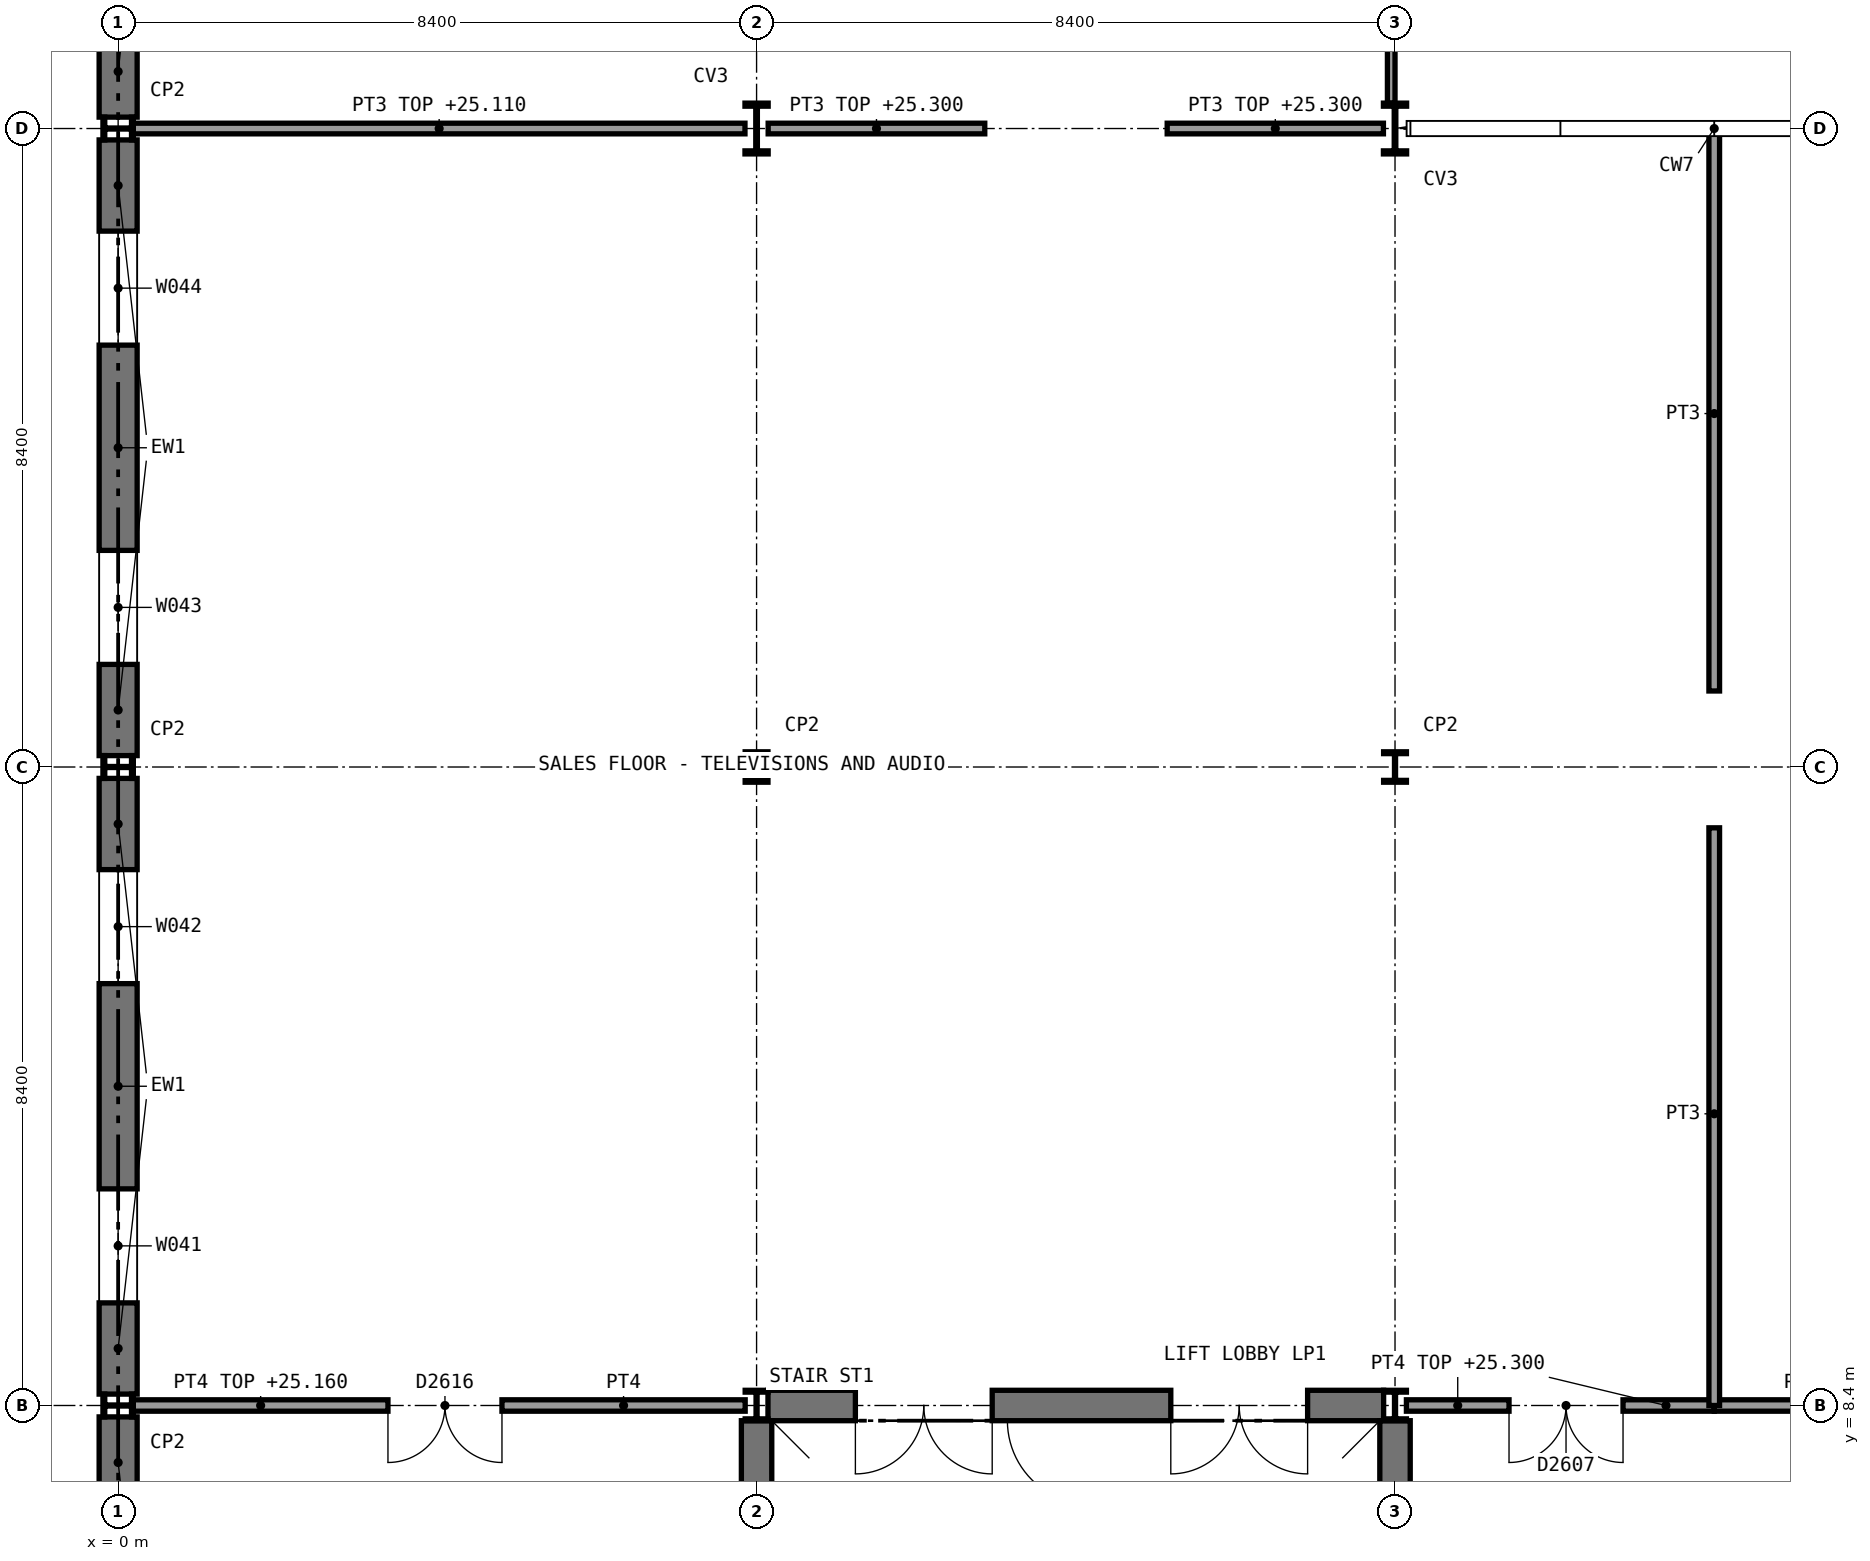
"""IFC4 building model, lengths in metres.
Left out: names, types, materials, properties, quantities, classifications, styles, units other than length and angle.
Written with IfcOpenShell. Run it as: python <this file> out.ifc"""

import sys

from ifc_helpers import new_model, si_unit, direction, frame, frame_2d, origin, origin_2d, place, context, subcontext, project, spatial, rectangle, i_section, extrude, element, fill, save


model = new_model("IFC4")
c1 = context("Model", 3, precision=1e-05, world=origin(), true_north=direction((0.0, 1.0)))
c2 = subcontext(c1, "Body", "Model", "MODEL_VIEW")
j1 = project(units=[si_unit("LENGTHUNIT", "METRE"), si_unit("PLANEANGLEUNIT", "RADIAN")], contexts=[c1])
p1 = place(None, origin())
s1 = spatial("IfcSite", under=j1, at=p1, CompositionType="ELEMENT")
p2 = place(p1, origin())
s2 = spatial("IfcBuilding", under=s1, at=p2, CompositionType="ELEMENT")
p3 = place(p2, frame((0.0, 0.0, 21.0)))
s3 = spatial("IfcBuildingStorey", under=s2, at=p3, CompositionType="ELEMENT", Elevation=21.0)
p4 = place(p3, frame((8.55, 8.4, 0.0), z_axis=(0.0, 0.0, 1.0), x_axis=(1.0, 0.0, 0.0)))
e1 = element("IfcWall", 1, at=p4, inside=s3, PredefinedType="SHEAR", context=c2, shape_type="SweptSolid", body=[
    extrude(rectangle(XDim=8.1, YDim=0.4, at=frame_2d((4.05, 0.0))), origin(), (0.0, 0.0, 1.0), 4.65),
])
p5 = place(p4, frame((1.15, 0.0, 0.0)))
e2 = element("IfcOpeningElement", 2, at=p5, cuts=e1, PredefinedType="OPENING", context=c2, shape_type="SweptSolid", body=[
    extrude(rectangle(XDim=1.8, YDim=2.1, at=frame_2d((0.9, 1.05))), frame((0.0, 0.21, 0.0), z_axis=(0.0, -1.0, 0.0), x_axis=(1.0, 0.0, 0.0)), (0.0, 0.0, 1.0), 0.42),
])
p6 = place(p4, frame((5.3, 0.0, 0.0)))
e3 = element("IfcOpeningElement", 3, at=p6, cuts=e1, PredefinedType="OPENING", context=c2, shape_type="SweptSolid", body=[
    extrude(rectangle(XDim=1.8, YDim=2.1, at=frame_2d((0.9, 1.05))), frame((0.0, 0.21, 0.0), z_axis=(0.0, -1.0, 0.0), x_axis=(1.0, 0.0, 0.0)), (0.0, 0.0, 1.0), 0.42),
])
for number, where, z_axis, x_axis in (
    (4, (8.4, 0.2, 0.0), (0.0, 0.0, 1.0), (0.0, 1.0, 0.0)),
    (5, (16.8, 0.2, 0.0), (0.0, 0.0, 1.0), (0.0, 1.0, 0.0)),
):
    element("IfcWall", number, at=place(p3, frame(where, z_axis=z_axis, x_axis=x_axis)), inside=s3, PredefinedType="SHEAR", context=c2, shape_type="SweptSolid", body=[
        extrude(rectangle(XDim=8.0, YDim=0.4, at=frame_2d((4.0, 0.0))), origin(), (0.0, 0.0, 1.0), 4.65),
    ])
for number, where, z_axis, x_axis in (
    (6, (0.0, 8.4, 0.0), (0.0, 0.0, 1.0), (0.0, 1.0, 0.0)),
    (7, (0.0, 16.8, 0.0), (0.0, 0.0, 1.0), (0.0, 1.0, 0.0)),
    (8, (0.0, 25.2, 0.0), (0.0, 0.0, 1.0), (0.0, 1.0, 0.0)),
    (9, (8.4, 8.4, 0.0), (0.0, 0.0, 1.0), (1.0, 0.0, 0.0)),
    (10, (8.4, 16.8, 0.0), (0.0, 0.0, 1.0), (1.0, 0.0, 0.0)),
):
    element("IfcColumn", number, at=place(p3, frame(where, z_axis=z_axis, x_axis=x_axis)), inside=s3, PredefinedType="COLUMN", context=c2, shape_type="SweptSolid", body=[
        extrude(i_section(OverallWidth=0.3, OverallDepth=0.4, WebThickness=0.013, FlangeThickness=0.024, FilletRadius=0.027, at=origin_2d()), origin(), (0.0, 0.0, 1.0), 4.8),
    ])
p7 = place(p3, frame((8.4, 25.2, 0.0), z_axis=(0.0, 0.0, 1.0), x_axis=(1.0, 0.0, 0.0)))
e11 = element("IfcColumn", 11, at=p7, inside=s3, PredefinedType="COLUMN", context=c2, shape_type="SweptSolid", body=[
    extrude(i_section(OverallWidth=0.305, OverallDepth=0.668, WebThickness=0.021, FlangeThickness=0.04, FilletRadius=0.027, at=origin_2d()), origin(), (0.0, 0.0, 1.0), 4.8),
])
for number, where, z_axis, x_axis in (
    (12, (16.8, 8.4, 0.0), (0.0, 0.0, 1.0), (1.0, 0.0, 0.0)),
    (13, (16.8, 16.8, 0.0), (0.0, 0.0, 1.0), (1.0, 0.0, 0.0)),
):
    element("IfcColumn", number, at=place(p3, frame(where, z_axis=z_axis, x_axis=x_axis)), inside=s3, PredefinedType="COLUMN", context=c2, shape_type="SweptSolid", body=[
        extrude(i_section(OverallWidth=0.3, OverallDepth=0.4, WebThickness=0.013, FlangeThickness=0.024, FilletRadius=0.027, at=origin_2d()), origin(), (0.0, 0.0, 1.0), 4.8),
    ])
p8 = place(p3, frame((16.8, 25.2, 0.0), z_axis=(0.0, 0.0, 1.0), x_axis=(1.0, 0.0, 0.0)))
e14 = element("IfcColumn", 14, at=p8, inside=s3, PredefinedType="COLUMN", context=c2, shape_type="SweptSolid", body=[
    extrude(i_section(OverallWidth=0.305, OverallDepth=0.668, WebThickness=0.021, FlangeThickness=0.04, FilletRadius=0.027, at=origin_2d()), origin(), (0.0, 0.0, 1.0), 4.8),
])
p9 = place(p3, frame((16.95, 8.4, 0.0), z_axis=(0.0, 0.0, 1.0), x_axis=(1.0, 0.0, 0.0)))
e15 = element("IfcWall", 15, at=p9, inside=s3, PredefinedType="SOLIDWALL", context=c2, shape_type="SweptSolid", body=[
    extrude(rectangle(XDim=4.05, YDim=0.15, at=frame_2d((2.025, 0.0))), origin(), (0.0, 0.0, 1.0), 4.3),
])
p10 = place(p9, frame((1.35, 0.0, 0.0)))
e16 = element("IfcOpeningElement", 16, at=p10, cuts=e15, PredefinedType="OPENING", context=c2, shape_type="SweptSolid", body=[
    extrude(rectangle(XDim=1.5, YDim=2.1, at=frame_2d((0.75, 1.05))), frame((0.0, 0.085, 0.0), z_axis=(0.0, -1.0, 0.0), x_axis=(1.0, 0.0, 0.0)), (0.0, 0.0, 1.0), 0.17),
])
p11 = place(p3, frame((21.0, 8.4, 0.0), z_axis=(0.0, 0.0, 1.0), x_axis=(1.0, 0.0, 0.0)))
e17 = element("IfcWall", 17, at=p11, inside=s3, PredefinedType="SOLIDWALL", context=c2, shape_type="SweptSolid", body=[
    extrude(rectangle(XDim=4.05, YDim=0.15, at=frame_2d((2.025, 0.0))), origin(), (0.0, 0.0, 1.0), 4.3),
])
p12 = place(p3, frame((0.2, 8.4, 0.0), z_axis=(0.0, 0.0, 1.0), x_axis=(1.0, 0.0, 0.0)))
e18 = element("IfcWall", 18, at=p12, inside=s3, PredefinedType="SOLIDWALL", context=c2, shape_type="SweptSolid", body=[
    extrude(rectangle(XDim=8.05, YDim=0.15, at=frame_2d((4.025, 0.0))), origin(), (0.0, 0.0, 1.0), 4.16),
])
p13 = place(p12, frame((3.35, 0.0, 0.0)))
e19 = element("IfcOpeningElement", 19, at=p13, cuts=e18, PredefinedType="OPENING", context=c2, shape_type="SweptSolid", body=[
    extrude(rectangle(XDim=1.5, YDim=2.1, at=frame_2d((0.75, 1.05))), frame((0.0, 0.085, 0.0), z_axis=(0.0, -1.0, 0.0), x_axis=(1.0, 0.0, 0.0)), (0.0, 0.0, 1.0), 0.17),
])
p14 = place(p3, frame((21.0, 8.4, 0.0), z_axis=(0.0, 0.0, 1.0), x_axis=(0.0, 1.0, 0.0)))
e20 = element("IfcWall", 20, at=p14, inside=s3, PredefinedType="PARTITIONING", context=c2, shape_type="SweptSolid", body=[
    extrude(rectangle(XDim=7.6, YDim=0.14, at=frame_2d((3.8, 0.0))), origin(), (0.0, 0.0, 1.0), 4.65),
])
p15 = place(p3, frame((21.0, 17.8, 0.0), z_axis=(0.0, 0.0, 1.0), x_axis=(0.0, 1.0, 0.0)))
e21 = element("IfcWall", 21, at=p15, inside=s3, PredefinedType="PARTITIONING", context=c2, shape_type="SweptSolid", body=[
    extrude(rectangle(XDim=7.4, YDim=0.14, at=frame_2d((3.7, 0.0))), origin(), (0.0, 0.0, 1.0), 4.65),
])
p16 = place(p3, frame((0.2, 25.2, 0.0), z_axis=(0.0, 0.0, 1.0), x_axis=(1.0, 0.0, 0.0)))
e22 = element("IfcWall", 22, at=p16, inside=s3, PredefinedType="PARTITIONING", context=c2, shape_type="SweptSolid", body=[
    extrude(rectangle(XDim=8.047, YDim=0.14, at=frame_2d((4.024, 0.0))), origin(), (0.0, 0.0, 1.0), 4.11),
])
p17 = place(p3, frame((8.552, 25.2, 0.0), z_axis=(0.0, 0.0, 1.0), x_axis=(1.0, 0.0, 0.0)))
e23 = element("IfcWall", 23, at=p17, inside=s3, PredefinedType="PARTITIONING", context=c2, shape_type="SweptSolid", body=[
    extrude(rectangle(XDim=2.85, YDim=0.14, at=frame_2d((1.425, 0.0))), origin(), (0.0, 0.0, 1.0), 4.3),
])
p18 = place(p3, frame((13.802, 25.2, 0.0), z_axis=(0.0, 0.0, 1.0), x_axis=(1.0, 0.0, 0.0)))
e24 = element("IfcWall", 24, at=p18, inside=s3, PredefinedType="PARTITIONING", context=c2, shape_type="SweptSolid", body=[
    extrude(rectangle(XDim=2.845, YDim=0.14, at=frame_2d((1.422, 0.0))), origin(), (0.0, 0.0, 1.0), 4.3),
])
p19 = place(p3, frame((0.0, 0.15, 0.0), z_axis=(0.0, 0.0, 1.0), x_axis=(0.0, 1.0, 0.0)))
e25 = element("IfcWall", 25, at=p19, inside=s3, PredefinedType="STANDARD", context=c2, shape_type="SweptSolid", body=[
    extrude(rectangle(XDim=8.1, YDim=0.5, at=frame_2d((4.05, 0.0))), origin(), (0.0, 0.0, 1.0), 4.65),
])
p20 = place(p19, frame((1.2, 0.0, 1.0)))
e26 = element("IfcOpeningElement", 26, at=p20, cuts=e25, PredefinedType="OPENING", context=c2, shape_type="SweptSolid", body=[
    extrude(rectangle(XDim=1.5, YDim=2.4, at=frame_2d((0.75, 1.2))), frame((0.0, 0.26, 0.0), z_axis=(0.0, -1.0, 0.0), x_axis=(1.0, 0.0, 0.0)), (0.0, 0.0, 1.0), 0.52),
])
p21 = place(p19, frame((5.4, 0.0, 1.0)))
e27 = element("IfcOpeningElement", 27, at=p21, cuts=e25, PredefinedType="OPENING", context=c2, shape_type="SweptSolid", body=[
    extrude(rectangle(XDim=1.5, YDim=2.4, at=frame_2d((0.75, 1.2))), frame((0.0, 0.26, 0.0), z_axis=(0.0, -1.0, 0.0), x_axis=(1.0, 0.0, 0.0)), (0.0, 0.0, 1.0), 0.52),
])
p22 = place(p3, frame((0.0, 8.55, 0.0), z_axis=(0.0, 0.0, 1.0), x_axis=(0.0, 1.0, 0.0)))
e28 = element("IfcWall", 28, at=p22, inside=s3, PredefinedType="STANDARD", context=c2, shape_type="SweptSolid", body=[
    extrude(rectangle(XDim=8.1, YDim=0.5, at=frame_2d((4.05, 0.0))), origin(), (0.0, 0.0, 1.0), 4.65),
])
p23 = place(p22, frame((1.2, 0.0, 1.0)))
e29 = element("IfcOpeningElement", 29, at=p23, cuts=e28, PredefinedType="OPENING", context=c2, shape_type="SweptSolid", body=[
    extrude(rectangle(XDim=1.5, YDim=2.4, at=frame_2d((0.75, 1.2))), frame((0.0, 0.26, 0.0), z_axis=(0.0, -1.0, 0.0), x_axis=(1.0, 0.0, 0.0)), (0.0, 0.0, 1.0), 0.52),
])
p24 = place(p22, frame((5.4, 0.0, 1.0)))
e30 = element("IfcOpeningElement", 30, at=p24, cuts=e28, PredefinedType="OPENING", context=c2, shape_type="SweptSolid", body=[
    extrude(rectangle(XDim=1.5, YDim=2.4, at=frame_2d((0.75, 1.2))), frame((0.0, 0.26, 0.0), z_axis=(0.0, -1.0, 0.0), x_axis=(1.0, 0.0, 0.0)), (0.0, 0.0, 1.0), 0.52),
])
p25 = place(p3, frame((0.0, 16.95, 0.0), z_axis=(0.0, 0.0, 1.0), x_axis=(0.0, 1.0, 0.0)))
e31 = element("IfcWall", 31, at=p25, inside=s3, PredefinedType="STANDARD", context=c2, shape_type="SweptSolid", body=[
    extrude(rectangle(XDim=8.1, YDim=0.5, at=frame_2d((4.05, 0.0))), origin(), (0.0, 0.0, 1.0), 4.65),
])
p26 = place(p25, frame((1.2, 0.0, 1.0)))
e32 = element("IfcOpeningElement", 32, at=p26, cuts=e31, PredefinedType="OPENING", context=c2, shape_type="SweptSolid", body=[
    extrude(rectangle(XDim=1.5, YDim=2.4, at=frame_2d((0.75, 1.2))), frame((0.0, 0.26, 0.0), z_axis=(0.0, -1.0, 0.0), x_axis=(1.0, 0.0, 0.0)), (0.0, 0.0, 1.0), 0.52),
])
p27 = place(p25, frame((5.4, 0.0, 1.0)))
e33 = element("IfcOpeningElement", 33, at=p27, cuts=e31, PredefinedType="OPENING", context=c2, shape_type="SweptSolid", body=[
    extrude(rectangle(XDim=1.5, YDim=2.4, at=frame_2d((0.75, 1.2))), frame((0.0, 0.26, 0.0), z_axis=(0.0, -1.0, 0.0), x_axis=(1.0, 0.0, 0.0)), (0.0, 0.0, 1.0), 0.52),
])
p28 = place(p3, frame((0.0, 25.35, 0.0), z_axis=(0.0, 0.0, 1.0), x_axis=(0.0, 1.0, 0.0)))
e34 = element("IfcWall", 34, at=p28, inside=s3, PredefinedType="STANDARD", context=c2, shape_type="SweptSolid", body=[
    extrude(rectangle(XDim=12.3, YDim=0.5, at=frame_2d((6.15, 0.0))), origin(), (0.0, 0.0, 1.0), 4.65),
])
p29 = place(p28, frame((1.2, 0.0, 1.0)))
e35 = element("IfcOpeningElement", 35, at=p29, cuts=e34, PredefinedType="OPENING", context=c2, shape_type="SweptSolid", body=[
    extrude(rectangle(XDim=1.5, YDim=2.4, at=frame_2d((0.75, 1.2))), frame((0.0, 0.26, 0.0), z_axis=(0.0, -1.0, 0.0), x_axis=(1.0, 0.0, 0.0)), (0.0, 0.0, 1.0), 0.52),
])
p30 = place(p28, frame((5.4, 0.0, 1.0)))
e36 = element("IfcOpeningElement", 36, at=p30, cuts=e34, PredefinedType="OPENING", context=c2, shape_type="SweptSolid", body=[
    extrude(rectangle(XDim=1.5, YDim=2.4, at=frame_2d((0.75, 1.2))), frame((0.0, 0.26, 0.0), z_axis=(0.0, -1.0, 0.0), x_axis=(1.0, 0.0, 0.0)), (0.0, 0.0, 1.0), 0.52),
])
p31 = place(p28, frame((9.6, 0.0, 1.0)))
e37 = element("IfcOpeningElement", 37, at=p31, cuts=e34, PredefinedType="OPENING", context=c2, shape_type="SweptSolid", body=[
    extrude(rectangle(XDim=1.5, YDim=2.4, at=frame_2d((0.75, 1.2))), frame((0.0, 0.26, 0.0), z_axis=(0.0, -1.0, 0.0), x_axis=(1.0, 0.0, 0.0)), (0.0, 0.0, 1.0), 0.52),
])
p32 = place(p3, frame((12.8, 0.2, 0.0), z_axis=(0.0, 0.0, 1.0), x_axis=(0.0, 1.0, 0.0)))
e38 = element("IfcWall", 38, at=p32, inside=s3, PredefinedType="SHEAR", context=c2, shape_type="SweptSolid", body=[
    extrude(rectangle(XDim=8.0, YDim=0.2, at=frame_2d((4.0, 0.0))), origin(), (0.0, 0.0, 1.0), 4.65),
])
p33 = place(p32, frame((6.9, 0.0, 0.0)))
e39 = element("IfcOpeningElement", 39, at=p33, cuts=e38, PredefinedType="OPENING", context=c2, shape_type="SweptSolid", body=[
    extrude(rectangle(XDim=1.11, YDim=2.1, at=frame_2d((0.555, 1.05))), frame((0.0, 0.11, 0.0), z_axis=(0.0, -1.0, 0.0), x_axis=(1.0, 0.0, 0.0)), (0.0, 0.0, 1.0), 0.22),
])
p34 = place(p3, frame((16.75, 25.534, 0.0), z_axis=(0.0, 0.0, 1.0), x_axis=(0.0, 1.0, 0.0)))
e40 = element("IfcWall", 40, at=p34, inside=s3, PredefinedType="PARTITIONING", context=c2, shape_type="SweptSolid", body=[
    extrude(rectangle(XDim=11.932, YDim=0.1, at=frame_2d((5.966, 0.0))), origin(), (0.0, 0.0, 1.0), 3.76),
])
p35 = place(p10, frame((1.5, 0.0, 0.0), z_axis=(0.0, 0.0, 1.0), x_axis=(-1.0, 0.0, 0.0)))
e41 = element("IfcDoor", 41, at=p35, inside=s3, OperationType="DOUBLE_DOOR_SINGLE_SWING", PredefinedType="DOOR", context=c2, shape_type="SweptSolid", body=[
    extrude(rectangle(XDim=1.5, YDim=2.1, at=frame_2d((0.75, 1.05))), frame((0.0, 0.025, 0.0), z_axis=(0.0, -1.0, 0.0), x_axis=(1.0, 0.0, 0.0)), (0.0, 0.0, 1.0), 0.05),
])
fill(e16, e41)
p36 = place(p13, frame((1.5, 0.0, 0.0), z_axis=(0.0, 0.0, 1.0), x_axis=(-1.0, 0.0, 0.0)))
e42 = element("IfcDoor", 42, at=p36, inside=s3, OperationType="DOUBLE_DOOR_SINGLE_SWING", PredefinedType="DOOR", context=c2, shape_type="SweptSolid", body=[
    extrude(rectangle(XDim=1.5, YDim=2.1, at=frame_2d((0.75, 1.05))), frame((0.0, 0.025, 0.0), z_axis=(0.0, -1.0, 0.0), x_axis=(1.0, 0.0, 0.0)), (0.0, 0.0, 1.0), 0.05),
])
fill(e19, e42)
p37 = place(p23, origin())
e43 = element("IfcWindow", 43, at=p37, inside=s3, PartitioningType="SINGLE_PANEL", PredefinedType="WINDOW", context=c2, shape_type="SweptSolid", body=[
    extrude(rectangle(XDim=1.5, YDim=2.4, at=frame_2d((0.75, 1.2))), frame((0.0, 0.03, 0.0), z_axis=(0.0, -1.0, 0.0), x_axis=(1.0, 0.0, 0.0)), (0.0, 0.0, 1.0), 0.06),
])
fill(e29, e43)
p38 = place(p24, origin())
e44 = element("IfcWindow", 44, at=p38, inside=s3, PartitioningType="SINGLE_PANEL", PredefinedType="WINDOW", context=c2, shape_type="SweptSolid", body=[
    extrude(rectangle(XDim=1.5, YDim=2.4, at=frame_2d((0.75, 1.2))), frame((0.0, 0.03, 0.0), z_axis=(0.0, -1.0, 0.0), x_axis=(1.0, 0.0, 0.0)), (0.0, 0.0, 1.0), 0.06),
])
fill(e30, e44)
p39 = place(p26, origin())
e45 = element("IfcWindow", 45, at=p39, inside=s3, PartitioningType="SINGLE_PANEL", PredefinedType="WINDOW", context=c2, shape_type="SweptSolid", body=[
    extrude(rectangle(XDim=1.5, YDim=2.4, at=frame_2d((0.75, 1.2))), frame((0.0, 0.03, 0.0), z_axis=(0.0, -1.0, 0.0), x_axis=(1.0, 0.0, 0.0)), (0.0, 0.0, 1.0), 0.06),
])
fill(e32, e45)
p40 = place(p27, origin())
e46 = element("IfcWindow", 46, at=p40, inside=s3, PartitioningType="SINGLE_PANEL", PredefinedType="WINDOW", context=c2, shape_type="SweptSolid", body=[
    extrude(rectangle(XDim=1.5, YDim=2.4, at=frame_2d((0.75, 1.2))), frame((0.0, 0.03, 0.0), z_axis=(0.0, -1.0, 0.0), x_axis=(1.0, 0.0, 0.0)), (0.0, 0.0, 1.0), 0.06),
])
fill(e33, e46)
p41 = place(p33, origin())
e47 = element("IfcDoor", 47, at=p41, inside=s3, OperationType="SINGLE_SWING_RIGHT", PredefinedType="DOOR", context=c2, shape_type="SweptSolid", body=[
    extrude(rectangle(XDim=1.1, YDim=2.1, at=frame_2d((0.55, 1.05))), frame((0.0, 0.025, 0.0), z_axis=(0.0, -1.0, 0.0), x_axis=(1.0, 0.0, 0.0)), (0.0, 0.0, 1.0), 0.05),
])
fill(e39, e47)
p42 = place(p5, frame((1.8, 0.0, 0.0), z_axis=(0.0, 0.0, 1.0), x_axis=(-1.0, 0.0, 0.0)))
e48 = element("IfcDoor", 48, at=p42, inside=s3, OperationType="DOUBLE_DOOR_SINGLE_SWING", PredefinedType="DOOR", context=c2, shape_type="SweptSolid", body=[
    extrude(rectangle(XDim=1.8, YDim=2.1, at=frame_2d((0.9, 1.05))), frame((0.0, 0.025, 0.0), z_axis=(0.0, -1.0, 0.0), x_axis=(1.0, 0.0, 0.0)), (0.0, 0.0, 1.0), 0.05),
])
fill(e2, e48)
p43 = place(p6, frame((1.8, 0.0, 0.0), z_axis=(0.0, 0.0, 1.0), x_axis=(-1.0, 0.0, 0.0)))
e49 = element("IfcDoor", 49, at=p43, inside=s3, OperationType="DOUBLE_DOOR_SINGLE_SWING", PredefinedType="DOOR", context=c2, shape_type="SweptSolid", body=[
    extrude(rectangle(XDim=1.8, YDim=2.1, at=frame_2d((0.9, 1.05))), frame((0.0, 0.025, 0.0), z_axis=(0.0, -1.0, 0.0), x_axis=(1.0, 0.0, 0.0)), (0.0, 0.0, 1.0), 0.05),
])
fill(e3, e49)
save(model, sys.argv[1])
